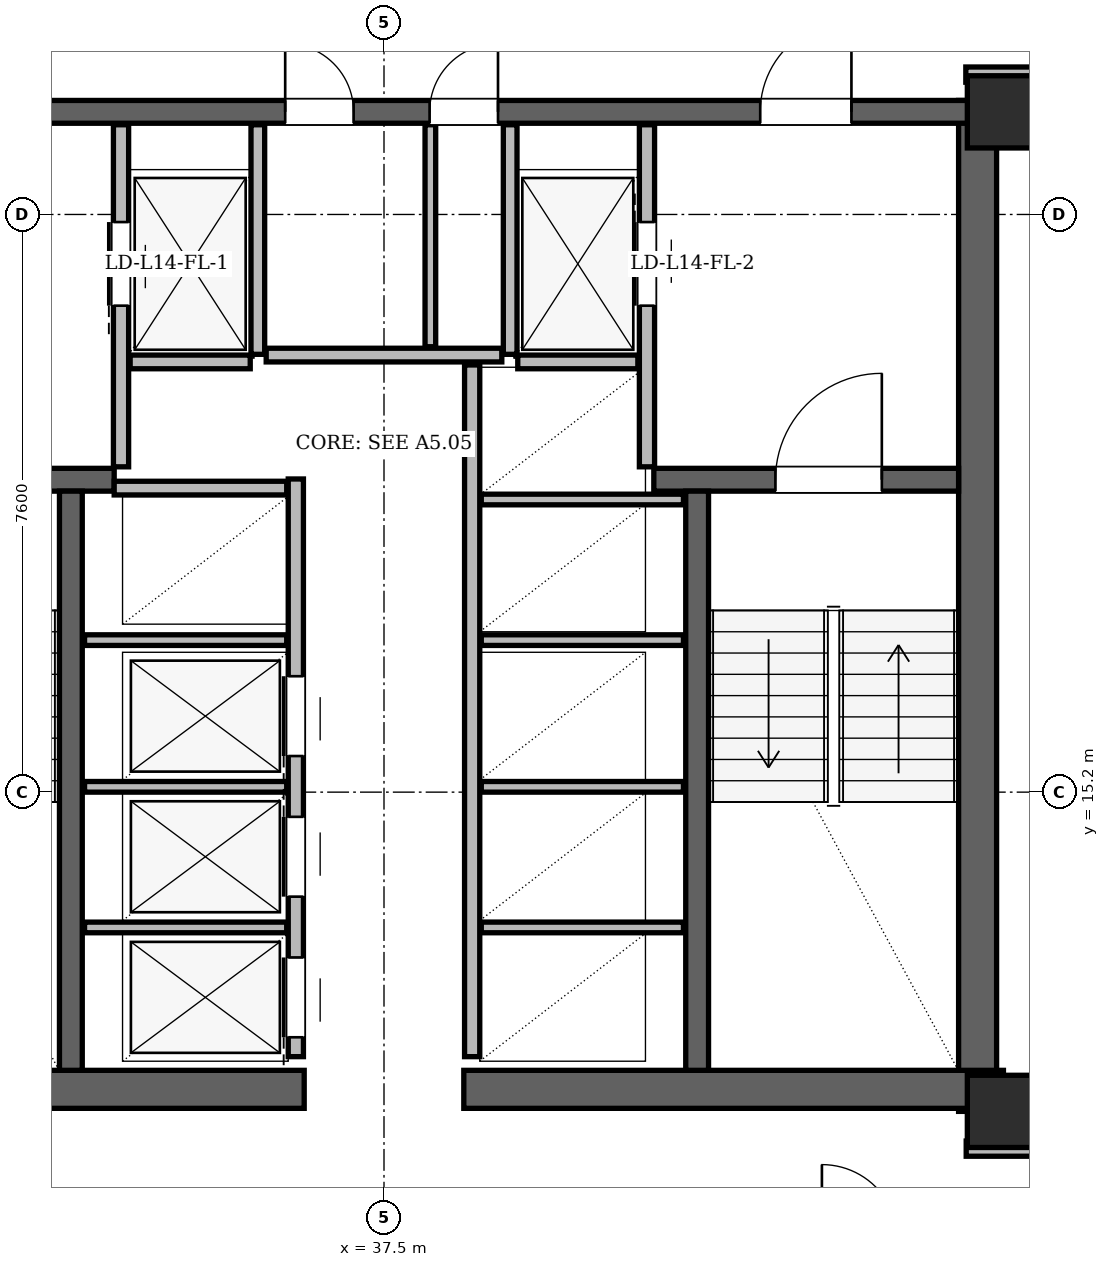
"""IFC4 building model, lengths in metres.
Left out: names, types, materials, properties, quantities, classifications, styles, units other than length and angle.
Written with IfcOpenShell. Run it as: python <this file> out.ifc"""

import sys

from ifc_helpers import new_model, si_unit, direction, frame, frame_2d, origin, origin_2d, place, context, subcontext, project, spatial, rectangle, hollow_rectangle, extrude, element, fill, save


model = new_model("IFC4")
c1 = context("Model", 3, precision=1e-05, world=origin(), true_north=direction((0.0, 1.0)))
c2 = subcontext(c1, "Body", "Model", "MODEL_VIEW")
j1 = project(units=[si_unit("LENGTHUNIT", "METRE"), si_unit("PLANEANGLEUNIT", "RADIAN")], contexts=[c1])
p1 = place(None, origin())
s1 = spatial("IfcSite", under=j1, at=p1, CompositionType="ELEMENT")
p2 = place(p1, origin())
s2 = spatial("IfcBuilding", under=s1, at=p2, CompositionType="ELEMENT")
p3 = place(p2, frame((0.0, 0.0, 56.1)))
s3 = spatial("IfcBuildingStorey", under=s2, at=p3, CompositionType="ELEMENT", Elevation=56.1)
for number, where, z_axis, x_axis in (
    (1, (45.65, 11.0, 0.0), (0.0, 0.0, 1.0), (1.0, 0.0, 0.0)),
    (2, (45.65, 24.15, 0.0), (0.0, 0.0, 1.0), (1.0, 0.0, 0.0)),
):
    element("IfcColumn", number, at=place(p3, frame(where, z_axis=z_axis, x_axis=x_axis)), inside=s3, PredefinedType="COLUMN", context=c2, shape_type="SweptSolid", body=[
        extrude(hollow_rectangle(XDim=0.95, YDim=0.95, WallThickness=0.08, at=origin_2d()), origin(), (0.0, 0.0, 1.0), 3.6),
    ])
p4 = place(p3, frame((45.31, 11.0, 0.0), z_axis=(0.0, 0.0, 1.0), x_axis=(0.0, 1.0, 0.0)))
e3 = element("IfcWall", 3, at=p4, inside=s3, PredefinedType="SHEAR", context=c2, shape_type="SweptSolid", body=[
    extrude(rectangle(XDim=13.3, YDim=0.5, at=frame_2d((6.65, 0.0))), origin(), (0.0, 0.0, 1.0), 3.36),
])
for number, where, z_axis, x_axis in (
    (4, (29.35, 11.29, 0.0), (0.0, 0.0, 1.0), (1.0, 0.0, 0.0)),
    (5, (38.55, 11.29, 0.0), (0.0, 0.0, 1.0), (1.0, 0.0, 0.0)),
):
    element("IfcWall", number, at=place(p3, frame(where, z_axis=z_axis, x_axis=x_axis)), inside=s3, PredefinedType="SHEAR", context=c2, shape_type="SweptSolid", body=[
        extrude(rectangle(XDim=7.1, YDim=0.5, at=frame_2d((3.55, 0.0))), origin(), (0.0, 0.0, 1.0), 3.36),
    ])
p5 = place(p3, frame((29.65, 24.15, 0.0), z_axis=(0.0, 0.0, 1.0), x_axis=(1.0, 0.0, 0.0)))
e6 = element("IfcWall", 6, at=p5, inside=s3, PredefinedType="SHEAR", context=c2, shape_type="SweptSolid", body=[
    extrude(rectangle(XDim=15.7, YDim=0.3, at=frame_2d((7.85, 0.0))), origin(), (0.0, 0.0, 1.0), 3.36),
])
p6 = place(p5, frame((1.7, 0.0, 0.0)))
e7 = element("IfcOpeningElement", 7, at=p6, cuts=e6, PredefinedType="OPENING", context=c2, shape_type="SweptSolid", body=[
    extrude(rectangle(XDim=1.2, YDim=2.2, at=frame_2d((0.6, 1.1))), frame((0.0, 0.15, 0.0), z_axis=(0.0, -1.0, 0.0), x_axis=(1.0, 0.0, 0.0)), (0.0, 0.0, 1.0), 0.3),
])
p7 = place(p5, frame((12.8, 0.0, 0.0)))
e8 = element("IfcOpeningElement", 8, at=p7, cuts=e6, PredefinedType="OPENING", context=c2, shape_type="SweptSolid", body=[
    extrude(rectangle(XDim=1.2, YDim=2.2, at=frame_2d((0.6, 1.1))), frame((0.0, 0.15, 0.0), z_axis=(0.0, -1.0, 0.0), x_axis=(1.0, 0.0, 0.0)), (0.0, 0.0, 1.0), 0.3),
])
p8 = place(p5, frame((6.55, 0.0, 0.0)))
e9 = element("IfcOpeningElement", 9, at=p8, cuts=e6, PredefinedType="OPENING", context=c2, shape_type="SweptSolid", body=[
    extrude(rectangle(XDim=0.9, YDim=2.05, at=frame_2d((0.45, 1.025))), frame((0.0, 0.15, 0.0), z_axis=(0.0, -1.0, 0.0), x_axis=(1.0, 0.0, 0.0)), (0.0, 0.0, 1.0), 0.3),
])
p9 = place(p5, frame((8.45, 0.0, 0.0)))
e10 = element("IfcOpeningElement", 10, at=p9, cuts=e6, PredefinedType="OPENING", context=c2, shape_type="SweptSolid", body=[
    extrude(rectangle(XDim=0.9, YDim=2.05, at=frame_2d((0.45, 1.025))), frame((0.0, 0.15, 0.0), z_axis=(0.0, -1.0, 0.0), x_axis=(1.0, 0.0, 0.0)), (0.0, 0.0, 1.0), 0.3),
])
p10 = place(p3, frame((29.94, 19.31, 0.0), z_axis=(0.0, 0.0, 1.0), x_axis=(1.0, 0.0, 0.0)))
e11 = element("IfcWall", 11, at=p10, inside=s3, PredefinedType="SHEAR", context=c2, shape_type="SweptSolid", body=[
    extrude(rectangle(XDim=4.01, YDim=0.3, at=frame_2d((2.005, 0.0))), origin(), (0.0, 0.0, 1.0), 3.36),
])
p11 = place(p10, frame((1.01, 0.0, 0.0)))
e12 = element("IfcOpeningElement", 12, at=p11, cuts=e11, PredefinedType="OPENING", context=c2, shape_type="SweptSolid", body=[
    extrude(rectangle(XDim=1.4, YDim=2.2, at=frame_2d((0.7, 1.1))), frame((0.0, 0.15, 0.0), z_axis=(0.0, -1.0, 0.0), x_axis=(1.0, 0.0, 0.0)), (0.0, 0.0, 1.0), 0.3),
])
p12 = place(p3, frame((41.05, 19.31, 0.0), z_axis=(0.0, 0.0, 1.0), x_axis=(1.0, 0.0, 0.0)))
e13 = element("IfcWall", 13, at=p12, inside=s3, PredefinedType="SHEAR", context=c2, shape_type="SweptSolid", body=[
    extrude(rectangle(XDim=4.01, YDim=0.3, at=frame_2d((2.005, 0.0))), origin(), (0.0, 0.0, 1.0), 3.36),
])
p13 = place(p12, frame((1.6, 0.0, 0.0)))
e14 = element("IfcOpeningElement", 14, at=p13, cuts=e13, PredefinedType="OPENING", context=c2, shape_type="SweptSolid", body=[
    extrude(rectangle(XDim=1.4, YDim=2.2, at=frame_2d((0.7, 1.1))), frame((0.0, 0.15, 0.0), z_axis=(0.0, -1.0, 0.0), x_axis=(1.0, 0.0, 0.0)), (0.0, 0.0, 1.0), 0.3),
])
for number, where, z_axis, x_axis in (
    (15, (33.38, 11.54, 0.0), (0.0, 0.0, 1.0), (0.0, 1.0, 0.0)),
    (16, (41.62, 11.54, 0.0), (0.0, 0.0, 1.0), (0.0, 1.0, 0.0)),
):
    element("IfcWall", number, at=place(p3, frame(where, z_axis=z_axis, x_axis=x_axis)), inside=s3, PredefinedType="SHEAR", context=c2, shape_type="SweptSolid", body=[
        extrude(rectangle(XDim=7.62, YDim=0.3, at=frame_2d((3.81, 0.0))), origin(), (0.0, 0.0, 1.0), 3.36),
    ])
p14 = place(p3, frame((61.396, 14.559, 0.0), z_axis=(0.0, 0.0, 1.0), x_axis=(-0.500002389912, 0.866024023964, 0.0)))
e17 = element("IfcWall", 17, at=p14, inside=s3, PredefinedType="SOLIDWALL", context=c2, shape_type="SweptSolid", body=[
    extrude(rectangle(XDim=33.494, YDim=0.34, at=frame_2d((16.747, 0.0))), origin(), (0.0, 0.0, 1.0), 2.494),
])
p15 = place(p14, frame((6.159, 0.0, 0.0)))
e18 = element("IfcOpeningElement", 18, at=p15, cuts=e17, PredefinedType="OPENING", context=c2, shape_type="SweptSolid", body=[
    extrude(rectangle(XDim=1.5, YDim=2.2, at=frame_2d((0.75, 1.1))), frame((0.0, 0.17, 0.0), z_axis=(0.0, -1.0, 0.0), x_axis=(1.0, 0.0, 0.0)), (0.0, 0.0, 1.0), 0.34),
])
p16 = place(p14, frame((24.379, 0.0, 0.0)))
e19 = element("IfcOpeningElement", 19, at=p16, cuts=e17, PredefinedType="OPENING", context=c2, shape_type="SweptSolid", body=[
    extrude(rectangle(XDim=1.5, YDim=2.2, at=frame_2d((0.75, 1.1))), frame((0.0, 0.17, 0.0), z_axis=(0.0, -1.0, 0.0), x_axis=(1.0, 0.0, 0.0)), (0.0, 0.0, 1.0), 0.34),
])
p17 = place(p14, frame((0.92, 0.0, 0.85)))
e20 = element("IfcOpeningElement", 20, at=p17, cuts=e17, PredefinedType="OPENING", context=c2, shape_type="SweptSolid", body=[
    extrude(rectangle(XDim=1.2, YDim=1.48, at=frame_2d((0.6, 0.74))), frame((0.0, 0.17, 0.0), z_axis=(0.0, -1.0, 0.0), x_axis=(1.0, 0.0, 0.0)), (0.0, 0.0, 1.0), 0.34),
])
p18 = place(p14, frame((10.928, 0.0, 0.85)))
e21 = element("IfcOpeningElement", 21, at=p18, cuts=e17, PredefinedType="OPENING", context=c2, shape_type="SweptSolid", body=[
    extrude(rectangle(XDim=1.6, YDim=1.534, at=frame_2d((0.8, 0.767))), frame((0.0, 0.17, 0.0), z_axis=(0.0, -1.0, 0.0), x_axis=(1.0, 0.0, 0.0)), (0.0, 0.0, 1.0), 0.34),
])
p19 = place(p14, frame((18.529, 0.0, 0.85)))
e22 = element("IfcOpeningElement", 22, at=p19, cuts=e17, PredefinedType="OPENING", context=c2, shape_type="SweptSolid", body=[
    extrude(rectangle(XDim=3.0, YDim=1.534, at=frame_2d((1.5, 0.767))), frame((0.0, 0.17, 0.0), z_axis=(0.0, -1.0, 0.0), x_axis=(1.0, 0.0, 0.0)), (0.0, 0.0, 1.0), 0.34),
])
p20 = place(p14, frame((3.162, 0.0, 0.85)))
e23 = element("IfcOpeningElement", 23, at=p20, cuts=e17, PredefinedType="OPENING", context=c2, shape_type="SweptSolid", body=[
    extrude(rectangle(XDim=1.2, YDim=1.48, at=frame_2d((0.6, 0.74))), frame((0.0, 0.17, 0.0), z_axis=(0.0, -1.0, 0.0), x_axis=(1.0, 0.0, 0.0)), (0.0, 0.0, 1.0), 0.34),
])
p21 = place(p3, frame((34.04, 19.48, 0.0), z_axis=(0.0, 0.0, 1.0), x_axis=(0.0, 1.0, 0.0)))
e24 = element("IfcWall", 24, at=p21, inside=s3, PredefinedType="PARTITIONING", context=c2, shape_type="SweptSolid", body=[
    extrude(rectangle(XDim=4.5, YDim=0.2, at=frame_2d((2.25, 0.0))), origin(), (0.0, 0.0, 1.0), 2.4),
])
p22 = place(p21, frame((2.12, 0.0, 0.0)))
e25 = element("IfcOpeningElement", 25, at=p22, cuts=e24, PredefinedType="OPENING", context=c2, shape_type="SweptSolid", body=[
    extrude(rectangle(XDim=1.1, YDim=2.2, at=frame_2d((0.55, 1.1))), frame((0.0, 0.1, 0.0), z_axis=(0.0, -1.0, 0.0), x_axis=(1.0, 0.0, 0.0)), (0.0, 0.0, 1.0), 0.2),
])
p23 = place(p3, frame((35.84, 20.96, 0.0), z_axis=(0.0, 0.0, 1.0), x_axis=(0.0, 1.0, 0.0)))
e26 = element("IfcWall", 26, at=p23, inside=s3, PredefinedType="PARTITIONING", context=c2, shape_type="SweptSolid", body=[
    extrude(rectangle(XDim=3.02, YDim=0.18, at=frame_2d((1.51, 0.0))), origin(), (0.0, 0.0, 1.0), 2.4),
])
p24 = place(p3, frame((34.16, 20.86, 0.0), z_axis=(0.0, 0.0, 1.0), x_axis=(1.0, 0.0, 0.0)))
e27 = element("IfcWall", 27, at=p24, inside=s3, PredefinedType="PARTITIONING", context=c2, shape_type="SweptSolid", body=[
    extrude(rectangle(XDim=1.58, YDim=0.18, at=frame_2d((0.79, 0.0))), origin(), (0.0, 0.0, 1.0), 3.36),
])
p25 = place(p3, frame((40.96, 19.48, 0.0), z_axis=(0.0, 0.0, 1.0), x_axis=(0.0, 1.0, 0.0)))
e28 = element("IfcWall", 28, at=p25, inside=s3, PredefinedType="PARTITIONING", context=c2, shape_type="SweptSolid", body=[
    extrude(rectangle(XDim=4.5, YDim=0.2, at=frame_2d((2.25, 0.0))), origin(), (0.0, 0.0, 1.0), 2.4),
])
p26 = place(p25, frame((2.12, 0.0, 0.0)))
e29 = element("IfcOpeningElement", 29, at=p26, cuts=e28, PredefinedType="OPENING", context=c2, shape_type="SweptSolid", body=[
    extrude(rectangle(XDim=1.1, YDim=2.2, at=frame_2d((0.55, 1.1))), frame((0.0, 0.1, 0.0), z_axis=(0.0, -1.0, 0.0), x_axis=(1.0, 0.0, 0.0)), (0.0, 0.0, 1.0), 0.2),
])
p27 = place(p3, frame((39.16, 20.96, 0.0), z_axis=(0.0, 0.0, 1.0), x_axis=(0.0, 1.0, 0.0)))
e30 = element("IfcWall", 30, at=p27, inside=s3, PredefinedType="PARTITIONING", context=c2, shape_type="SweptSolid", body=[
    extrude(rectangle(XDim=3.02, YDim=0.18, at=frame_2d((1.51, 0.0))), origin(), (0.0, 0.0, 1.0), 2.4),
])
p28 = place(p3, frame((39.26, 20.86, 0.0), z_axis=(0.0, 0.0, 1.0), x_axis=(1.0, 0.0, 0.0)))
e31 = element("IfcWall", 31, at=p28, inside=s3, PredefinedType="PARTITIONING", context=c2, shape_type="SweptSolid", body=[
    extrude(rectangle(XDim=1.58, YDim=0.18, at=frame_2d((0.79, 0.0))), origin(), (0.0, 0.0, 1.0), 3.36),
])
p29 = place(p3, frame((36.34, 11.72, 0.0), z_axis=(0.0, 0.0, 1.0), x_axis=(0.0, 1.0, 0.0)))
e32 = element("IfcWall", 32, at=p29, inside=s3, PredefinedType="PARTITIONING", context=c2, shape_type="SweptSolid", body=[
    extrude(rectangle(XDim=7.6, YDim=0.2, at=frame_2d((3.8, 0.0))), origin(), (0.0, 0.0, 1.0), 3.36),
])
p30 = place(p29, frame((0.255, 0.0, 0.0)))
e33 = element("IfcOpeningElement", 33, at=p30, cuts=e32, PredefinedType="OPENING", context=c2, shape_type="SweptSolid", body=[
    extrude(rectangle(XDim=1.05, YDim=2.15, at=frame_2d((0.525, 1.075))), frame((0.0, 0.1, 0.0), z_axis=(0.0, -1.0, 0.0), x_axis=(1.0, 0.0, 0.0)), (0.0, 0.0, 1.0), 0.2),
])
p31 = place(p29, frame((2.105, 0.0, 0.0)))
e34 = element("IfcOpeningElement", 34, at=p31, cuts=e32, PredefinedType="OPENING", context=c2, shape_type="SweptSolid", body=[
    extrude(rectangle(XDim=1.05, YDim=2.15, at=frame_2d((0.525, 1.075))), frame((0.0, 0.1, 0.0), z_axis=(0.0, -1.0, 0.0), x_axis=(1.0, 0.0, 0.0)), (0.0, 0.0, 1.0), 0.2),
])
p32 = place(p29, frame((3.955, 0.0, 0.0)))
e35 = element("IfcOpeningElement", 35, at=p32, cuts=e32, PredefinedType="OPENING", context=c2, shape_type="SweptSolid", body=[
    extrude(rectangle(XDim=1.05, YDim=2.15, at=frame_2d((0.525, 1.075))), frame((0.0, 0.1, 0.0), z_axis=(0.0, -1.0, 0.0), x_axis=(1.0, 0.0, 0.0)), (0.0, 0.0, 1.0), 0.2),
])
p33 = place(p3, frame((33.95, 19.2, 0.0), z_axis=(0.0, 0.0, 1.0), x_axis=(1.0, 0.0, 0.0)))
e36 = element("IfcWall", 36, at=p33, inside=s3, PredefinedType="PARTITIONING", context=c2, shape_type="SweptSolid", body=[
    extrude(rectangle(XDim=2.27, YDim=0.18, at=frame_2d((1.135, 0.0))), origin(), (0.0, 0.0, 1.0), 3.36),
])
for number, where, z_axis, x_axis in (
    (37, (33.56, 13.42, 0.0), (0.0, 0.0, 1.0), (1.0, 0.0, 0.0)),
    (38, (33.56, 15.27, 0.0), (0.0, 0.0, 1.0), (1.0, 0.0, 0.0)),
    (39, (33.56, 17.2, 0.0), (0.0, 0.0, 1.0), (1.0, 0.0, 0.0)),
):
    element("IfcWall", number, at=place(p3, frame(where, z_axis=z_axis, x_axis=x_axis)), inside=s3, PredefinedType="PARTITIONING", context=c2, shape_type="SweptSolid", body=[
        extrude(rectangle(XDim=2.66, YDim=0.14, at=frame_2d((1.33, 0.0))), origin(), (0.0, 0.0, 1.0), 3.36),
    ])
p34 = place(p3, frame((38.66, 11.72, 0.0), z_axis=(0.0, 0.0, 1.0), x_axis=(0.0, 1.0, 0.0)))
e40 = element("IfcWall", 40, at=p34, inside=s3, PredefinedType="PARTITIONING", context=c2, shape_type="SweptSolid", body=[
    extrude(rectangle(XDim=9.1, YDim=0.2, at=frame_2d((4.55, 0.0))), origin(), (0.0, 0.0, 1.0), 3.36),
])
for number, where, z_axis, x_axis in (
    (41, (38.78, 13.42, 0.0), (0.0, 0.0, 1.0), (1.0, 0.0, 0.0)),
    (42, (38.78, 15.27, 0.0), (0.0, 0.0, 1.0), (1.0, 0.0, 0.0)),
    (43, (38.78, 17.2, 0.0), (0.0, 0.0, 1.0), (1.0, 0.0, 0.0)),
    (44, (38.78, 19.05, 0.0), (0.0, 0.0, 1.0), (1.0, 0.0, 0.0)),
):
    element("IfcWall", number, at=place(p3, frame(where, z_axis=z_axis, x_axis=x_axis)), inside=s3, PredefinedType="PARTITIONING", context=c2, shape_type="SweptSolid", body=[
        extrude(rectangle(XDim=2.66, YDim=0.14, at=frame_2d((1.33, 0.0))), origin(), (0.0, 0.0, 1.0), 3.36),
    ])
p35 = place(p3, frame((35.95, 20.95, 0.0), z_axis=(0.0, 0.0, 1.0), x_axis=(1.0, 0.0, 0.0)))
e45 = element("IfcWall", 45, at=p35, inside=s3, PredefinedType="PARTITIONING", context=c2, shape_type="SweptSolid", body=[
    extrude(rectangle(XDim=3.1, YDim=0.18, at=frame_2d((1.55, 0.0))), origin(), (0.0, 0.0, 1.0), 3.36),
])
p36 = place(p3, frame((38.11, 21.06, 0.0), z_axis=(0.0, 0.0, 1.0), x_axis=(0.0, 1.0, 0.0)))
e46 = element("IfcWall", 46, at=p36, inside=s3, PredefinedType="PARTITIONING", context=c2, shape_type="SweptSolid", body=[
    extrude(rectangle(XDim=2.92, YDim=0.14, at=frame_2d((1.46, 0.0))), origin(), (0.0, 0.0, 1.0), 2.4),
])
p37 = place(p3, frame((45.16, 10.51, 0.0), z_axis=(0.0, 0.0, 1.0), x_axis=(1.0, 0.0, 0.0)))
e47 = element("IfcWall", 47, at=p37, inside=s3, PredefinedType="PARTITIONING", context=c2, shape_type="SweptSolid", body=[
    extrude(rectangle(XDim=0.98, YDim=0.2, at=frame_2d((0.49, 0.0))), origin(), (0.0, 0.0, 1.0), 2.738),
])
p38 = place(p3, frame((45.155, 24.64, 0.0), z_axis=(0.0, 0.0, 1.0), x_axis=(1.0, 0.0, 0.0)))
e48 = element("IfcWall", 48, at=p38, inside=s3, PredefinedType="PARTITIONING", context=c2, shape_type="SweptSolid", body=[
    extrude(rectangle(XDim=0.99, YDim=0.2, at=frame_2d((0.495, 0.0))), origin(), (0.0, 0.0, 1.0), 2.738),
])
p39 = place(p22, origin())
e49 = element("IfcDoor", 49, at=p39, inside=s3, OperationType="SLIDING_TO_LEFT", PredefinedType="DOOR", context=c2, shape_type="SweptSolid", body=[
    extrude(rectangle(XDim=1.1, YDim=2.2, at=frame_2d((0.55, 1.1))), frame((0.0, 0.025, 0.0), z_axis=(0.0, -1.0, 0.0), x_axis=(1.0, 0.0, 0.0)), (0.0, 0.0, 1.0), 0.05),
])
fill(e25, e49)
p40 = place(p26, origin())
e50 = element("IfcDoor", 50, at=p40, inside=s3, OperationType="SLIDING_TO_RIGHT", PredefinedType="DOOR", context=c2, shape_type="SweptSolid", body=[
    extrude(rectangle(XDim=1.1, YDim=2.2, at=frame_2d((0.55, 1.1))), frame((0.0, 0.025, 0.0), z_axis=(0.0, -1.0, 0.0), x_axis=(1.0, 0.0, 0.0)), (0.0, 0.0, 1.0), 0.05),
])
fill(e29, e50)
p41 = place(p30, origin())
e51 = element("IfcDoor", 51, at=p41, inside=s3, OperationType="SLIDING_TO_LEFT", PredefinedType="DOOR", context=c2, shape_type="SweptSolid", body=[
    extrude(rectangle(XDim=1.05, YDim=2.15, at=frame_2d((0.525, 1.075))), frame((0.0, 0.025, 0.0), z_axis=(0.0, -1.0, 0.0), x_axis=(1.0, 0.0, 0.0)), (0.0, 0.0, 1.0), 0.05),
])
fill(e33, e51)
p42 = place(p31, origin())
e52 = element("IfcDoor", 52, at=p42, inside=s3, OperationType="SLIDING_TO_RIGHT", PredefinedType="DOOR", context=c2, shape_type="SweptSolid", body=[
    extrude(rectangle(XDim=1.05, YDim=2.15, at=frame_2d((0.525, 1.075))), frame((0.0, 0.025, 0.0), z_axis=(0.0, -1.0, 0.0), x_axis=(1.0, 0.0, 0.0)), (0.0, 0.0, 1.0), 0.05),
])
fill(e34, e52)
p43 = place(p32, origin())
e53 = element("IfcDoor", 53, at=p43, inside=s3, OperationType="SLIDING_TO_LEFT", PredefinedType="DOOR", context=c2, shape_type="SweptSolid", body=[
    extrude(rectangle(XDim=1.05, YDim=2.15, at=frame_2d((0.525, 1.075))), frame((0.0, 0.025, 0.0), z_axis=(0.0, -1.0, 0.0), x_axis=(1.0, 0.0, 0.0)), (0.0, 0.0, 1.0), 0.05),
])
fill(e35, e53)
p44 = place(p13, origin())
e54 = element("IfcDoor", 54, at=p44, inside=s3, OperationType="SINGLE_SWING_RIGHT", PredefinedType="DOOR", context=c2, shape_type="SweptSolid", body=[
    extrude(rectangle(XDim=1.4, YDim=2.2, at=frame_2d((0.7, 1.1))), frame((0.0, 0.025, 0.0), z_axis=(0.0, -1.0, 0.0), x_axis=(1.0, 0.0, 0.0)), (0.0, 0.0, 1.0), 0.05),
])
fill(e14, e54)
p45 = place(p7, origin())
e55 = element("IfcDoor", 55, at=p45, inside=s3, OperationType="SINGLE_SWING_RIGHT", PredefinedType="DOOR", context=c2, shape_type="SweptSolid", body=[
    extrude(rectangle(XDim=1.2, YDim=2.2, at=frame_2d((0.6, 1.1))), frame((0.0, 0.025, 0.0), z_axis=(0.0, -1.0, 0.0), x_axis=(1.0, 0.0, 0.0)), (0.0, 0.0, 1.0), 0.05),
])
fill(e8, e55)
p46 = place(p8, origin())
e56 = element("IfcDoor", 56, at=p46, inside=s3, OperationType="SINGLE_SWING_LEFT", PredefinedType="DOOR", context=c2, shape_type="SweptSolid", body=[
    extrude(rectangle(XDim=0.9, YDim=2.05, at=frame_2d((0.45, 1.025))), frame((0.0, 0.025, 0.0), z_axis=(0.0, -1.0, 0.0), x_axis=(1.0, 0.0, 0.0)), (0.0, 0.0, 1.0), 0.05),
])
fill(e9, e56)
p47 = place(p9, origin())
e57 = element("IfcDoor", 57, at=p47, inside=s3, OperationType="SINGLE_SWING_RIGHT", PredefinedType="DOOR", context=c2, shape_type="SweptSolid", body=[
    extrude(rectangle(XDim=0.9, YDim=2.05, at=frame_2d((0.45, 1.025))), frame((0.0, 0.025, 0.0), z_axis=(0.0, -1.0, 0.0), x_axis=(1.0, 0.0, 0.0)), (0.0, 0.0, 1.0), 0.05),
])
fill(e10, e57)
save(model, sys.argv[1])
